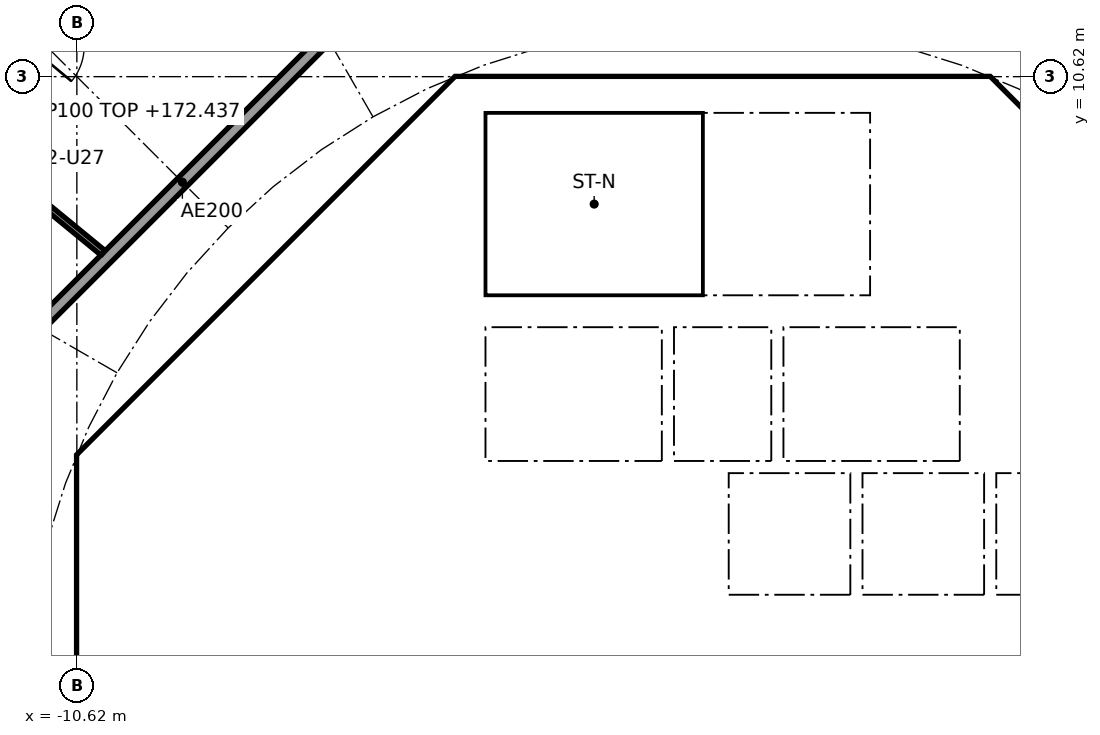
"""IFC4 building model, lengths in metres.
Left out: names, types, materials, properties, quantities, classifications, styles, units other than length and angle.
Written with IfcOpenShell. Run it as: python <this file> out.ifc"""

import sys

from ifc_helpers import new_model, si_unit, direction, frame, frame_2d, origin, place, context, subcontext, project, spatial, polyline, rectangle, outline, extrude, element, fill, save


model = new_model("IFC4")
c1 = context("Model", 3, precision=1e-05, world=origin(), true_north=direction((0.0, 1.0)))
c2 = subcontext(c1, "Body", "Model", "MODEL_VIEW")
j1 = project(units=[si_unit("LENGTHUNIT", "METRE"), si_unit("PLANEANGLEUNIT", "RADIAN")], contexts=[c1])
p1 = place(None, origin())
s1 = spatial("IfcSite", under=j1, at=p1, CompositionType="ELEMENT")
p2 = place(p1, origin())
s2 = spatial("IfcBuilding", under=s1, at=p2, CompositionType="ELEMENT")
p3 = place(p2, frame((0.0, 0.0, 169.6)))
s3 = spatial("IfcBuildingStorey", under=s2, at=p3, CompositionType="ELEMENT", Elevation=169.6)
p4 = place(p3, frame((9.988, 4.613, 0.0), z_axis=(0.0, 0.0, 1.0), x_axis=(-0.707106781187, 0.707106781187, 0.0)))
e1 = element("IfcWall", 1, at=p4, inside=s3, PredefinedType="SHEAR", context=c2, shape_type="SweptSolid", body=[
    extrude(rectangle(XDim=7.602, YDim=0.6, at=frame_2d((3.801, 0.0))), origin(), (0.0, 0.0, 1.0), 3.44),
])
p5 = place(p4, frame((3.201, 0.0, 0.0)))
e2 = element("IfcOpeningElement", 2, at=p5, cuts=e1, PredefinedType="OPENING", context=c2, shape_type="SweptSolid", body=[
    extrude(rectangle(XDim=1.2, YDim=2.1, at=frame_2d((0.6, 1.05))), frame((0.0, 0.31, 0.0), z_axis=(0.0, -1.0, 0.0), x_axis=(1.0, 0.0, 0.0)), (0.0, 0.0, 1.0), 0.62),
])
p6 = place(p3, frame((-4.613, 9.988, 0.0), z_axis=(0.0, 0.0, 1.0), x_axis=(-0.707106781187, -0.707106781187, 0.0)))
e3 = element("IfcWall", 3, at=p6, inside=s3, PredefinedType="SHEAR", context=c2, shape_type="SweptSolid", body=[
    extrude(rectangle(XDim=7.602, YDim=0.6, at=frame_2d((3.801, 0.0))), origin(), (0.0, 0.0, 1.0), 3.44),
])
p7 = place(p6, frame((0.351, 0.0, 0.0)))
e4 = element("IfcOpeningElement", 4, at=p7, cuts=e3, PredefinedType="OPENING", context=c2, shape_type="SweptSolid", body=[
    extrude(rectangle(XDim=1.1, YDim=2.1, at=frame_2d((0.55, 1.05))), frame((0.0, 0.31, 0.0), z_axis=(0.0, -1.0, 0.0), x_axis=(1.0, 0.0, 0.0)), (0.0, 0.0, 1.0), 0.62),
])
p8 = place(p3, frame((-10.325, 3.801, 0.0), z_axis=(0.0, 0.0, 1.0), x_axis=(0.0, -1.0, 0.0)))
e5 = element("IfcWall", 5, at=p8, inside=s3, PredefinedType="SHEAR", context=c2, shape_type="SweptSolid", body=[
    extrude(rectangle(XDim=7.602, YDim=0.6, at=frame_2d((3.801, 0.0))), origin(), (0.0, 0.0, 1.0), 3.44),
])
p9 = place(p8, frame((0.651, 0.0, 0.0)))
e6 = element("IfcOpeningElement", 6, at=p9, cuts=e5, PredefinedType="OPENING", context=c2, shape_type="SweptSolid", body=[
    extrude(rectangle(XDim=1.5, YDim=2.1, at=frame_2d((0.75, 1.05))), frame((0.0, 0.31, 0.0), z_axis=(0.0, -1.0, 0.0), x_axis=(1.0, 0.0, 0.0)), (0.0, 0.0, 1.0), 0.62),
])
p10 = place(p8, frame((5.451, 0.0, 0.0)))
e7 = element("IfcOpeningElement", 7, at=p10, cuts=e5, PredefinedType="OPENING", context=c2, shape_type="SweptSolid", body=[
    extrude(rectangle(XDim=1.5, YDim=2.1, at=frame_2d((0.75, 1.05))), frame((0.0, 0.31, 0.0), z_axis=(0.0, -1.0, 0.0), x_axis=(1.0, 0.0, 0.0)), (0.0, 0.0, 1.0), 0.62),
])
p11 = place(p3, frame((-5.8, 4.3, 0.0), z_axis=(0.0, 0.0, 1.0), x_axis=(0.0, 1.0, 0.0)))
e8 = element("IfcWall", 8, at=p11, inside=s3, PredefinedType="PARTITIONING", context=c2, shape_type="SweptSolid", body=[
    extrude(rectangle(XDim=3.927, YDim=0.15, at=frame_2d((1.963, 0.0))), origin(), (0.0, 0.0, 1.0), 3.44),
])
p12 = place(p11, frame((1.551, 0.0, 0.0)))
e9 = element("IfcOpeningElement", 9, at=p12, cuts=e8, PredefinedType="OPENING", context=c2, shape_type="SweptSolid", body=[
    extrude(rectangle(XDim=0.9, YDim=2.1, at=frame_2d((0.45, 1.05))), frame((0.0, 0.085, 0.0), z_axis=(0.0, -1.0, 0.0), x_axis=(1.0, 0.0, 0.0)), (0.0, 0.0, 1.0), 0.17),
])
p13 = place(p3, frame((4.0, 4.3, 0.0), z_axis=(0.0, 0.0, 1.0), x_axis=(0.0, 1.0, 0.0)))
e10 = element("IfcWall", 10, at=p13, inside=s3, PredefinedType="SOLIDWALL", context=c2, shape_type="SweptSolid", body=[
    extrude(rectangle(XDim=2.2, YDim=0.2, at=frame_2d((1.1, 0.0))), origin(), (0.0, 0.0, 1.0), 3.44),
])
p14 = place(p13, frame((0.55, 0.0, 0.0)))
e11 = element("IfcOpeningElement", 11, at=p14, cuts=e10, PredefinedType="OPENING", context=c2, shape_type="SweptSolid", body=[
    extrude(rectangle(XDim=1.1, YDim=2.1, at=frame_2d((0.55, 1.05))), frame((0.0, 0.11, 0.0), z_axis=(0.0, -1.0, 0.0), x_axis=(1.0, 0.0, 0.0)), (0.0, 0.0, 1.0), 0.22),
])
p15 = place(p3, frame((-4.0, 4.3, 0.0), z_axis=(0.0, 0.0, 1.0), x_axis=(0.0, 1.0, 0.0)))
e12 = element("IfcWall", 12, at=p15, inside=s3, PredefinedType="SOLIDWALL", context=c2, shape_type="SweptSolid", body=[
    extrude(rectangle(XDim=2.2, YDim=0.2, at=frame_2d((1.1, 0.0))), origin(), (0.0, 0.0, 1.0), 3.44),
])
p16 = place(p15, frame((0.55, 0.0, 0.0)))
e13 = element("IfcOpeningElement", 13, at=p16, cuts=e12, PredefinedType="OPENING", context=c2, shape_type="SweptSolid", body=[
    extrude(rectangle(XDim=1.1, YDim=2.1, at=frame_2d((0.55, 1.05))), frame((0.0, 0.11, 0.0), z_axis=(0.0, -1.0, 0.0), x_axis=(1.0, 0.0, 0.0)), (0.0, 0.0, 1.0), 0.22),
])
p17 = place(p3, frame((-6.7, 2.0, 0.0), z_axis=(0.0, 0.0, 1.0), x_axis=(1.0, 0.0, 0.0)))
e14 = element("IfcWall", 14, at=p17, inside=s3, PredefinedType="SOLIDWALL", context=c2, shape_type="SweptSolid", body=[
    extrude(rectangle(XDim=13.4, YDim=0.2, at=frame_2d((6.7, 0.0))), origin(), (0.0, 0.0, 1.0), 3.44),
])
p18 = place(p17, frame((7.25, 0.0, 0.0)))
e15 = element("IfcOpeningElement", 15, at=p18, cuts=e14, PredefinedType="OPENING", context=c2, shape_type="SweptSolid", body=[
    extrude(rectangle(XDim=1.1, YDim=2.1, at=frame_2d((0.55, 1.05))), frame((0.0, 0.11, 0.0), z_axis=(0.0, -1.0, 0.0), x_axis=(1.0, 0.0, 0.0)), (0.0, 0.0, 1.0), 0.22),
])
p19 = place(p17, frame((9.45, 0.0, 0.0)))
e16 = element("IfcOpeningElement", 16, at=p19, cuts=e14, PredefinedType="OPENING", context=c2, shape_type="SweptSolid", body=[
    extrude(rectangle(XDim=1.1, YDim=2.1, at=frame_2d((0.55, 1.05))), frame((0.0, 0.11, 0.0), z_axis=(0.0, -1.0, 0.0), x_axis=(1.0, 0.0, 0.0)), (0.0, 0.0, 1.0), 0.22),
])
p20 = place(p17, frame((2.95, 0.0, 0.0)))
e17 = element("IfcOpeningElement", 17, at=p20, cuts=e14, PredefinedType="OPENING", context=c2, shape_type="SweptSolid", body=[
    extrude(rectangle(XDim=0.9, YDim=2.1, at=frame_2d((0.45, 1.05))), frame((0.0, 0.11, 0.0), z_axis=(0.0, -1.0, 0.0), x_axis=(1.0, 0.0, 0.0)), (0.0, 0.0, 1.0), 0.22),
])
p21 = place(p3, frame((4.0, 7.025, 0.0), z_axis=(0.0, 0.0, 1.0), x_axis=(0.0, 1.0, 0.0)))
e18 = element("IfcWall", 18, at=p21, inside=s3, PredefinedType="SOLIDWALL", context=c2, shape_type="SweptSolid", body=[
    extrude(rectangle(XDim=3.0, YDim=0.2, at=frame_2d((1.5, 0.0))), origin(), (0.0, 0.0, 1.0), 3.44),
])
p22 = place(p21, frame((0.925, 0.0, 0.0)))
e19 = element("IfcOpeningElement", 19, at=p22, cuts=e18, PredefinedType="OPENING", context=c2, shape_type="SweptSolid", body=[
    extrude(rectangle(XDim=1.1, YDim=2.1, at=frame_2d((0.55, 1.05))), frame((0.0, 0.11, 0.0), z_axis=(0.0, -1.0, 0.0), x_axis=(1.0, 0.0, 0.0)), (0.0, 0.0, 1.0), 0.22),
])
p23 = place(p3, origin())
e20 = element("IfcWall", 20, at=p23, inside=s3, PredefinedType="SHEAR", context=c2, shape_type="SweptSolid", body=[
    extrude(outline(polyline([(-10.2, 4.825), (-9.776, 4.401), (-10.025, 4.152), (-10.025, 3.801), (-10.625, 3.801), (-10.625, 4.401), (-10.2, 4.825)])), origin(), (0.0, 0.0, 1.0), 3.44),
])
p24 = place(p3, origin())
e21 = element("IfcWall", 21, at=p24, inside=s3, PredefinedType="SHEAR", context=c2, shape_type="SweptSolid", body=[
    extrude(outline(polyline([(-4.152, 10.025), (-4.401, 9.776), (-4.825, 10.2), (-4.401, 10.625), (4.401, 10.625), (4.825, 10.2), (4.401, 9.776), (4.152, 10.025), (-4.152, 10.025)])), origin(), (0.0, 0.0, 1.0), 3.44),
])
for number, where, z_axis, x_axis in (
    (22, (-0.9, 4.3, 0.0), (0.0, 0.0, 1.0), (0.0, 1.0, 0.0)),
    (23, (0.9, 4.3, 0.0), (0.0, 0.0, 1.0), (0.0, 1.0, 0.0)),
):
    element("IfcWall", number, at=place(p3, frame(where, z_axis=z_axis, x_axis=x_axis)), inside=s3, PredefinedType="SOLIDWALL", context=c2, shape_type="SweptSolid", body=[
        extrude(rectangle(XDim=2.2, YDim=0.2, at=frame_2d((1.1, 0.0))), origin(), (0.0, 0.0, 1.0), 3.44),
    ])
p25 = place(p3, origin())
e24 = element("IfcWall", 24, at=p25, inside=s3, PredefinedType="SOLIDWALL", context=c2, shape_type="SweptSolid", body=[
    extrude(outline(polyline([(-6.7, 4.3), (6.7, 4.3), (6.7, 2.1), (6.5, 2.1), (6.5, 4.1), (4.5, 4.1), (4.5, 2.1), (4.3, 2.1), (4.3, 4.1), (2.3, 4.1), (2.3, 2.1), (2.1, 2.1), (2.1, 4.1), (0.1, 4.1), (0.1, 2.1), (-0.1, 2.1), (-0.1, 4.1), (-6.5, 4.1), (-6.5, 2.1), (-6.7, 2.1), (-6.7, 4.3)])), origin(), (0.0, 0.0, 1.0), 3.44),
])
p26 = place(p3, frame((-10.025, 4.0, 0.0), z_axis=(0.0, 0.0, 1.0), x_axis=(1.0, 0.0, 0.0)))
e25 = element("IfcWall", 25, at=p26, inside=s3, PredefinedType="PARTITIONING", context=c2, shape_type="SweptSolid", body=[
    extrude(rectangle(XDim=3.325, YDim=0.2, at=frame_2d((1.662, 0.0))), origin(), (0.0, 0.0, 1.0), 3.44),
])
p27 = place(p3, origin())
e26 = element("IfcWall", 26, at=p27, inside=s3, PredefinedType="SOLIDWALL", context=c2, shape_type="SweptSolid", body=[
    extrude(outline(polyline([(-3.9, 7.025), (-4.1, 7.025), (-4.1, 10.025), (-3.9, 10.025), (-3.9, 7.025)])), origin(), (0.0, 0.0, 1.0), 3.44),
])
p28 = place(p3, origin())
e27 = element("IfcWall", 27, at=p28, inside=s3, PredefinedType="SOLIDWALL", context=c2, shape_type="SweptSolid", body=[
    extrude(outline(polyline([(4.1, 6.5), (-4.1, 6.5), (-4.1, 7.025), (4.1, 7.025), (4.1, 6.5)])), origin(), (0.0, 0.0, 1.0), 3.44),
])
p29 = place(p3, frame((-5.275, 12.494, 0.0), z_axis=(0.0, 0.0, 1.0), x_axis=(-0.707106781187, -0.707106781187, 0.0)))
e28 = element("IfcWall", 28, at=p29, inside=s3, PredefinedType="PARTITIONING", context=c2, shape_type="SweptSolid", body=[
    extrude(rectangle(XDim=10.209, YDim=0.2, at=frame_2d((5.104, 0.0))), origin(), (0.0, 0.0, 1.0), 3.44),
])
p30 = place(p3, frame((-9.631, 13.242, 0.0), z_axis=(0.0, 0.0, 1.0), x_axis=(-0.640315711982, -0.768111833647, 0.0)))
e29 = element("IfcWall", 29, at=p30, inside=s3, PredefinedType="PARTITIONING", context=c2, shape_type="SweptSolid", body=[
    extrude(rectangle(XDim=4.572, YDim=0.1, at=frame_2d((2.286, 0.0))), origin(), (0.0, 0.0, 1.0), 2.837),
])
p31 = place(p30, frame((1.861, 0.0, 0.0)))
e30 = element("IfcOpeningElement", 30, at=p31, cuts=e29, PredefinedType="OPENING", context=c2, shape_type="SweptSolid", body=[
    extrude(rectangle(XDim=0.9, YDim=2.1, at=frame_2d((0.45, 1.05))), frame((0.0, 0.06, 0.0), z_axis=(0.0, -1.0, 0.0), x_axis=(1.0, 0.0, 0.0)), (0.0, 0.0, 1.0), 0.12),
])
p32 = place(p3, frame((-10.189, 7.721, 0.0), z_axis=(0.0, 0.0, 1.0), x_axis=(-0.773134429339, 0.634242188892, 0.0)))
e31 = element("IfcWall", 31, at=p32, inside=s3, PredefinedType="PARTITIONING", context=c2, shape_type="SweptSolid", body=[
    extrude(rectangle(XDim=9.552, YDim=0.1, at=frame_2d((4.776, 0.0))), origin(), (0.0, 0.0, 1.0), 2.756),
])
p33 = place(p32, frame((7.59, 0.0, 0.0)))
e32 = element("IfcOpeningElement", 32, at=p33, cuts=e31, PredefinedType="OPENING", context=c2, shape_type="SweptSolid", body=[
    extrude(rectangle(XDim=0.9, YDim=2.1, at=frame_2d((0.45, 1.05))), frame((0.0, 0.06, 0.0), z_axis=(0.0, -1.0, 0.0), x_axis=(1.0, 0.0, 0.0)), (0.0, 0.0, 1.0), 0.12),
])
p34 = place(p32, frame((1.104, 0.0, 0.0)))
e33 = element("IfcOpeningElement", 33, at=p34, cuts=e31, PredefinedType="OPENING", context=c2, shape_type="SweptSolid", body=[
    extrude(rectangle(XDim=0.9, YDim=2.1, at=frame_2d((0.45, 1.05))), frame((0.0, 0.06, 0.0), z_axis=(0.0, -1.0, 0.0), x_axis=(1.0, 0.0, 0.0)), (0.0, 0.0, 1.0), 0.12),
])
p35 = place(p18, origin())
e34 = element("IfcDoor", 34, at=p35, inside=s3, OperationType="DOUBLE_DOOR_SLIDING", PredefinedType="DOOR", context=c2, shape_type="SweptSolid", body=[
    extrude(rectangle(XDim=1.1, YDim=2.1, at=frame_2d((0.55, 1.05))), frame((0.0, 0.025, 0.0), z_axis=(0.0, -1.0, 0.0), x_axis=(1.0, 0.0, 0.0)), (0.0, 0.0, 1.0), 0.05),
])
fill(e15, e34)
p36 = place(p19, origin())
e35 = element("IfcDoor", 35, at=p36, inside=s3, OperationType="DOUBLE_DOOR_SLIDING", PredefinedType="DOOR", context=c2, shape_type="SweptSolid", body=[
    extrude(rectangle(XDim=1.1, YDim=2.1, at=frame_2d((0.55, 1.05))), frame((0.0, 0.025, 0.0), z_axis=(0.0, -1.0, 0.0), x_axis=(1.0, 0.0, 0.0)), (0.0, 0.0, 1.0), 0.05),
])
fill(e16, e35)
p37 = place(p14, origin())
e36 = element("IfcDoor", 36, at=p37, inside=s3, OperationType="DOUBLE_DOOR_SLIDING", PredefinedType="DOOR", context=c2, shape_type="SweptSolid", body=[
    extrude(rectangle(XDim=1.1, YDim=2.1, at=frame_2d((0.55, 1.05))), frame((0.0, 0.025, 0.0), z_axis=(0.0, -1.0, 0.0), x_axis=(1.0, 0.0, 0.0)), (0.0, 0.0, 1.0), 0.05),
])
fill(e11, e36)
p38 = place(p16, origin())
e37 = element("IfcDoor", 37, at=p38, inside=s3, OperationType="DOUBLE_DOOR_SLIDING", PredefinedType="DOOR", context=c2, shape_type="SweptSolid", body=[
    extrude(rectangle(XDim=1.1, YDim=2.1, at=frame_2d((0.55, 1.05))), frame((0.0, 0.025, 0.0), z_axis=(0.0, -1.0, 0.0), x_axis=(1.0, 0.0, 0.0)), (0.0, 0.0, 1.0), 0.05),
])
fill(e13, e37)
p39 = place(p22, origin())
e38 = element("IfcDoor", 38, at=p39, inside=s3, OperationType="SINGLE_SWING_LEFT", PredefinedType="DOOR", context=c2, shape_type="SweptSolid", body=[
    extrude(rectangle(XDim=1.1, YDim=2.1, at=frame_2d((0.55, 1.05))), frame((0.0, 0.025, 0.0), z_axis=(0.0, -1.0, 0.0), x_axis=(1.0, 0.0, 0.0)), (0.0, 0.0, 1.0), 0.05),
])
fill(e19, e38)
p40 = place(p12, origin())
e39 = element("IfcDoor", 39, at=p40, inside=s3, OperationType="SINGLE_SWING_RIGHT", PredefinedType="DOOR", context=c2, shape_type="SweptSolid", body=[
    extrude(rectangle(XDim=0.9, YDim=2.1, at=frame_2d((0.45, 1.05))), frame((0.0, 0.025, 0.0), z_axis=(0.0, -1.0, 0.0), x_axis=(1.0, 0.0, 0.0)), (0.0, 0.0, 1.0), 0.05),
])
fill(e9, e39)
p41 = place(p20, origin())
e40 = element("IfcDoor", 40, at=p41, inside=s3, OperationType="SINGLE_SWING_LEFT", PredefinedType="DOOR", context=c2, shape_type="SweptSolid", body=[
    extrude(rectangle(XDim=0.9, YDim=2.1, at=frame_2d((0.45, 1.05))), frame((0.0, 0.025, 0.0), z_axis=(0.0, -1.0, 0.0), x_axis=(1.0, 0.0, 0.0)), (0.0, 0.0, 1.0), 0.05),
])
fill(e17, e40)
p42 = place(p9, origin())
e41 = element("IfcDoor", 41, at=p42, inside=s3, OperationType="DOUBLE_DOOR_SINGLE_SWING", PredefinedType="DOOR", context=c2, shape_type="SweptSolid", body=[
    extrude(rectangle(XDim=1.5, YDim=2.1, at=frame_2d((0.75, 1.05))), frame((0.0, 0.025, 0.0), z_axis=(0.0, -1.0, 0.0), x_axis=(1.0, 0.0, 0.0)), (0.0, 0.0, 1.0), 0.05),
])
fill(e6, e41)
p43 = place(p7, origin())
e42 = element("IfcDoor", 42, at=p43, inside=s3, OperationType="SINGLE_SWING_RIGHT", PredefinedType="DOOR", context=c2, shape_type="SweptSolid", body=[
    extrude(rectangle(XDim=1.1, YDim=2.1, at=frame_2d((0.55, 1.05))), frame((0.0, 0.025, 0.0), z_axis=(0.0, -1.0, 0.0), x_axis=(1.0, 0.0, 0.0)), (0.0, 0.0, 1.0), 0.05),
])
fill(e4, e42)
save(model, sys.argv[1])
